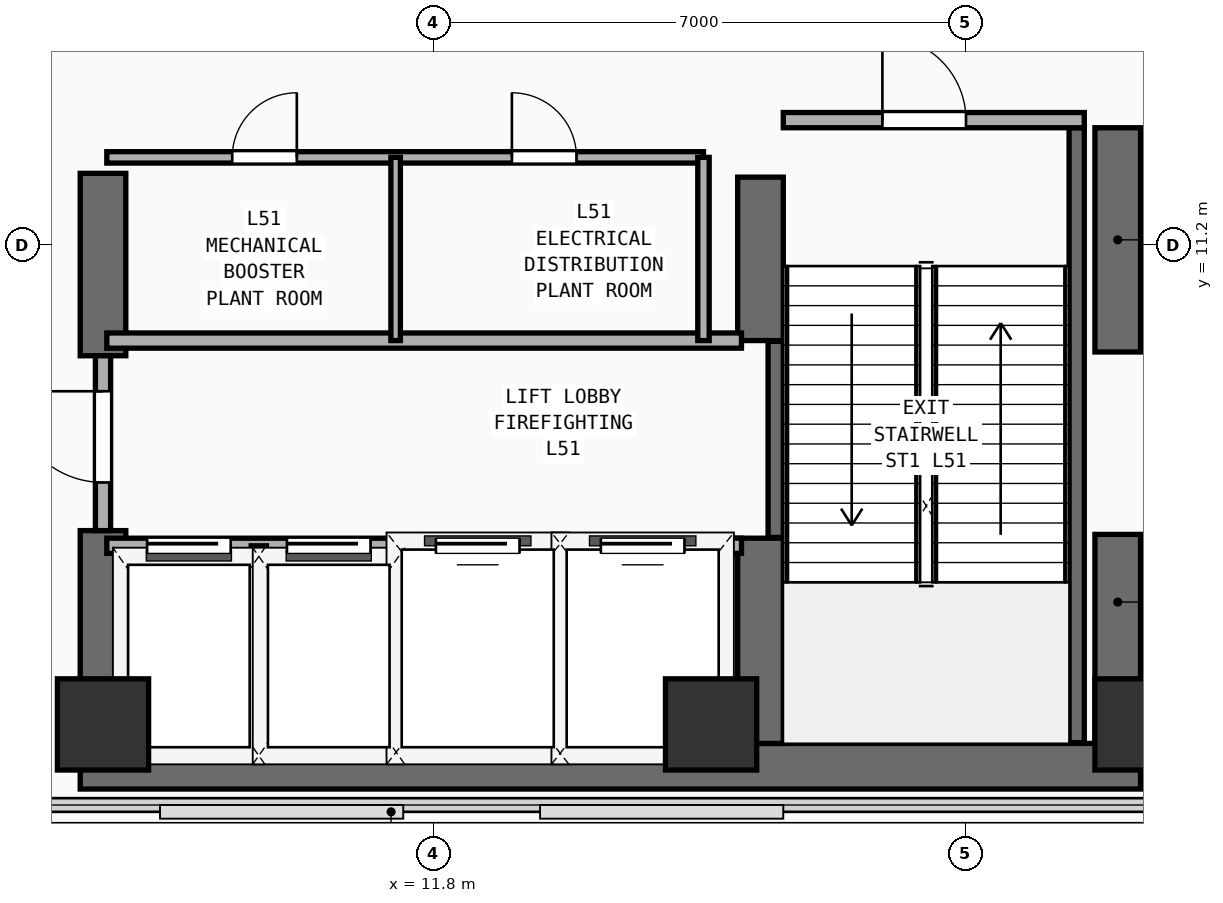
"""IFC4 building model, lengths in metres.
Left out: names, types, materials, properties, quantities, classifications, styles, units other than length and angle.
Written with IfcOpenShell. Run it as: python <this file> out.ifc"""

import sys

from ifc_helpers import new_model, si_unit, direction, frame, frame_2d, origin, origin_2d, place, context, subcontext, project, spatial, rectangle, extrude, element, fill, save


model = new_model("IFC4")
c1 = context("Model", 3, precision=1e-05, world=origin(), true_north=direction((0.0, 1.0)))
c2 = subcontext(c1, "Body", "Model", "MODEL_VIEW")
j1 = project(units=[si_unit("LENGTHUNIT", "METRE"), si_unit("PLANEANGLEUNIT", "RADIAN")], contexts=[c1])
p1 = place(None, origin())
s1 = spatial("IfcSite", under=j1, at=p1, CompositionType="ELEMENT")
p2 = place(p1, origin())
s2 = spatial("IfcBuilding", under=s1, at=p2, CompositionType="ELEMENT")
p3 = place(p2, frame((0.0, 0.0, 199.4)))
s3 = spatial("IfcBuildingStorey", under=s2, at=p3, CompositionType="ELEMENT", Elevation=199.4)
p4 = place(p3, frame((7.15, 4.35, 0.0), z_axis=(0.0, 0.0, 1.0), x_axis=(1.0, 0.0, 0.0)))
e1 = element("IfcWall", 1, at=p4, inside=s3, PredefinedType="SHEAR", context=c2, shape_type="SweptSolid", body=[
    extrude(rectangle(XDim=13.95, YDim=0.6, at=frame_2d((6.975, 0.0))), origin(), (0.0, 0.0, 1.0), 4.86),
])
p5 = place(p3, frame((7.45, 4.65, 0.0), z_axis=(0.0, 0.0, 1.0), x_axis=(0.0, 1.0, 0.0)))
e2 = element("IfcWall", 2, at=p5, inside=s3, PredefinedType="SHEAR", context=c2, shape_type="SweptSolid", body=[
    extrude(rectangle(XDim=2.8, YDim=0.6, at=frame_2d((1.4, 0.0))), origin(), (0.0, 0.0, 1.0), 4.86),
])
p6 = place(p3, frame((7.45, 9.75, 0.0), z_axis=(0.0, 0.0, 1.0), x_axis=(0.0, 1.0, 0.0)))
e3 = element("IfcWall", 3, at=p6, inside=s3, PredefinedType="SHEAR", context=c2, shape_type="SweptSolid", body=[
    extrude(rectangle(XDim=2.4, YDim=0.6, at=frame_2d((1.2, 0.0))), origin(), (0.0, 0.0, 1.0), 4.86),
])
p7 = place(p3, frame((20.8, 4.65, 0.0), z_axis=(0.0, 0.0, 1.0), x_axis=(0.0, 1.0, 0.0)))
e4 = element("IfcWall", 4, at=p7, inside=s3, PredefinedType="SHEAR", context=c2, shape_type="SweptSolid", body=[
    extrude(rectangle(XDim=2.75, YDim=0.6, at=frame_2d((1.375, 0.0))), origin(), (0.0, 0.0, 1.0), 4.86),
])
p8 = place(p3, frame((20.8, 9.8, 0.0), z_axis=(0.0, 0.0, 1.0), x_axis=(0.0, 1.0, 0.0)))
e5 = element("IfcWall", 5, at=p8, inside=s3, PredefinedType="SHEAR", context=c2, shape_type="SweptSolid", body=[
    extrude(rectangle(XDim=2.95, YDim=0.6, at=frame_2d((1.475, 0.0))), origin(), (0.0, 0.0, 1.0), 4.86),
])
p9 = place(p3, frame((16.1, 4.65, 0.0), z_axis=(0.0, 0.0, 1.0), x_axis=(0.0, 1.0, 0.0)))
e6 = element("IfcWall", 6, at=p9, inside=s3, PredefinedType="SHEAR", context=c2, shape_type="SweptSolid", body=[
    extrude(rectangle(XDim=2.7, YDim=0.6, at=frame_2d((1.35, 0.0))), origin(), (0.0, 0.0, 1.0), 4.86),
])
p10 = place(p3, frame((16.1, 9.95, 0.0), z_axis=(0.0, 0.0, 1.0), x_axis=(0.0, 1.0, 0.0)))
e7 = element("IfcWall", 7, at=p10, inside=s3, PredefinedType="SHEAR", context=c2, shape_type="SweptSolid", body=[
    extrude(rectangle(XDim=2.15, YDim=0.6, at=frame_2d((1.075, 0.0))), origin(), (0.0, 0.0, 1.0), 4.86),
])
for number, where, z_axis, x_axis in (
    (8, (7.45, 4.9, 0.0), (0.0, 0.0, 1.0), (1.0, 0.0, 0.0)),
    (9, (15.45, 4.9, 0.0), (0.0, 0.0, 1.0), (1.0, 0.0, 0.0)),
    (10, (21.1, 4.9, 0.0), (0.0, 0.0, 1.0), (1.0, 0.0, 0.0)),
):
    element("IfcColumn", number, at=place(p3, frame(where, z_axis=z_axis, x_axis=x_axis)), inside=s3, PredefinedType="COLUMN", context=c2, shape_type="SweptSolid", body=[
        extrude(rectangle(XDim=1.2, YDim=1.2, at=origin_2d()), origin(), (0.0, 0.0, 1.0), 4.86),
    ])
p11 = place(p3, frame((16.3, 7.36, 0.0), z_axis=(0.0, 0.0, 1.0), x_axis=(0.0, 1.0, 0.0)))
e11 = element("IfcWall", 11, at=p11, inside=s3, PredefinedType="SHEAR", context=c2, shape_type="SweptSolid", body=[
    extrude(rectangle(XDim=2.58, YDim=0.2, at=frame_2d((1.29, 0.0))), origin(), (0.0, 0.0, 1.0), 4.86),
])
p12 = place(p3, frame((20.26, 4.66, 0.0), z_axis=(0.0, 0.0, 1.0), x_axis=(0.0, 1.0, 0.0)))
e12 = element("IfcWall", 12, at=p12, inside=s3, PredefinedType="SHEAR", context=c2, shape_type="SweptSolid", body=[
    extrude(rectangle(XDim=8.09, YDim=0.2, at=frame_2d((4.045, 0.0))), origin(), (0.0, 0.0, 1.0), 4.86),
])
p13 = place(p3, frame((16.4, 12.85, 0.0), z_axis=(0.0, 0.0, 1.0), x_axis=(1.0, 0.0, 0.0)))
e13 = element("IfcWall", 13, at=p13, inside=s3, PredefinedType="PARTITIONING", context=c2, shape_type="SweptSolid", body=[
    extrude(rectangle(XDim=3.96, YDim=0.2, at=frame_2d((1.98, 0.0))), origin(), (0.0, 0.0, 1.0), 4.86),
])
p14 = place(p13, frame((1.304, 0.0, 0.0)))
e14 = element("IfcOpeningElement", 14, at=p14, cuts=e13, PredefinedType="OPENING", context=c2, shape_type="SweptSolid", body=[
    extrude(rectangle(XDim=1.1, YDim=2.2, at=frame_2d((0.55, 1.1))), frame((0.0, 0.11, 0.0), z_axis=(0.0, -1.0, 0.0), x_axis=(1.0, 0.0, 0.0)), (0.0, 0.0, 1.0), 0.22),
])
p15 = place(p3, frame((7.5, 7.25, 0.0), z_axis=(0.0, 0.0, 1.0), x_axis=(1.0, 0.0, 0.0)))
e15 = element("IfcWall", 15, at=p15, inside=s3, PredefinedType="PARTITIONING", context=c2, shape_type="SweptSolid", body=[
    extrude(rectangle(XDim=8.35, YDim=0.2, at=frame_2d((4.175, 0.0))), origin(), (0.0, 0.0, 1.0), 4.86),
])
p16 = place(p15, frame((0.53, 0.0, 0.0)))
e16 = element("IfcOpeningElement", 16, at=p16, cuts=e15, PredefinedType="OPENING", context=c2, shape_type="SweptSolid", body=[
    extrude(rectangle(XDim=1.1, YDim=2.2, at=frame_2d((0.55, 1.1))), frame((0.0, 0.11, 0.0), z_axis=(0.0, -1.0, 0.0), x_axis=(1.0, 0.0, 0.0)), (0.0, 0.0, 1.0), 0.22),
])
p17 = place(p15, frame((2.37, 0.0, 0.0)))
e17 = element("IfcOpeningElement", 17, at=p17, cuts=e15, PredefinedType="OPENING", context=c2, shape_type="SweptSolid", body=[
    extrude(rectangle(XDim=1.1, YDim=2.2, at=frame_2d((0.55, 1.1))), frame((0.0, 0.11, 0.0), z_axis=(0.0, -1.0, 0.0), x_axis=(1.0, 0.0, 0.0)), (0.0, 0.0, 1.0), 0.22),
])
p18 = place(p15, frame((4.33, 0.0, 0.0)))
e18 = element("IfcOpeningElement", 18, at=p18, cuts=e15, PredefinedType="OPENING", context=c2, shape_type="SweptSolid", body=[
    extrude(rectangle(XDim=1.1, YDim=2.2, at=frame_2d((0.55, 1.1))), frame((0.0, 0.11, 0.0), z_axis=(0.0, -1.0, 0.0), x_axis=(1.0, 0.0, 0.0)), (0.0, 0.0, 1.0), 0.22),
])
p19 = place(p15, frame((6.5, 0.0, 0.0)))
e19 = element("IfcOpeningElement", 19, at=p19, cuts=e15, PredefinedType="OPENING", context=c2, shape_type="SweptSolid", body=[
    extrude(rectangle(XDim=1.1, YDim=2.2, at=frame_2d((0.55, 1.1))), frame((0.0, 0.11, 0.0), z_axis=(0.0, -1.0, 0.0), x_axis=(1.0, 0.0, 0.0)), (0.0, 0.0, 1.0), 0.22),
])
p20 = place(p3, frame((7.5, 9.95, 0.0), z_axis=(0.0, 0.0, 1.0), x_axis=(1.0, 0.0, 0.0)))
e20 = element("IfcWall", 20, at=p20, inside=s3, PredefinedType="PARTITIONING", context=c2, shape_type="SweptSolid", body=[
    extrude(rectangle(XDim=8.35, YDim=0.2, at=frame_2d((4.175, 0.0))), origin(), (0.0, 0.0, 1.0), 4.86),
])
for number, where, z_axis, x_axis in (
    (21, (9.5, 4.45, 0.0), (0.0, 0.0, 1.0), (0.0, 1.0, 0.0)),
    (22, (11.36, 4.45, 0.0), (0.0, 0.0, 1.0), (0.0, 1.0, 0.0)),
    (23, (13.46, 4.45, 0.0), (0.0, 0.0, 1.0), (0.0, 1.0, 0.0)),
):
    element("IfcWall", number, at=place(p3, frame(where, z_axis=z_axis, x_axis=x_axis)), inside=s3, PredefinedType="PARTITIONING", context=c2, shape_type="SweptSolid", body=[
        extrude(rectangle(XDim=2.8, YDim=0.2, at=frame_2d((1.4, 0.0))), origin(), (0.0, 0.0, 1.0), 4.86),
    ])
p21 = place(p3, frame((7.45, 7.45, 0.0), z_axis=(0.0, 0.0, 1.0), x_axis=(0.0, 1.0, 0.0)))
e24 = element("IfcWall", 24, at=p21, inside=s3, PredefinedType="PARTITIONING", context=c2, shape_type="SweptSolid", body=[
    extrude(rectangle(XDim=2.3, YDim=0.2, at=frame_2d((1.15, 0.0))), origin(), (0.0, 0.0, 1.0), 3.84),
])
p22 = place(p21, frame((0.633, 0.0, 0.0)))
e25 = element("IfcOpeningElement", 25, at=p22, cuts=e24, PredefinedType="OPENING", context=c2, shape_type="SweptSolid", body=[
    extrude(rectangle(XDim=1.2, YDim=2.25, at=frame_2d((0.6, 1.125))), frame((0.0, 0.11, 0.0), z_axis=(0.0, -1.0, 0.0), x_axis=(1.0, 0.0, 0.0)), (0.0, 0.0, 1.0), 0.22),
])
p23 = place(p3, frame((7.5, 12.36, 0.0), z_axis=(0.0, 0.0, 1.0), x_axis=(1.0, 0.0, 0.0)))
e26 = element("IfcWall", 26, at=p23, inside=s3, PredefinedType="PARTITIONING", context=c2, shape_type="SweptSolid", body=[
    extrude(rectangle(XDim=7.85, YDim=0.15, at=frame_2d((3.925, 0.0))), origin(), (0.0, 0.0, 1.0), 4.86),
])
p24 = place(p23, frame((1.65, 0.0, 0.0)))
e27 = element("IfcOpeningElement", 27, at=p24, cuts=e26, PredefinedType="OPENING", context=c2, shape_type="SweptSolid", body=[
    extrude(rectangle(XDim=0.85, YDim=2.15, at=frame_2d((0.425, 1.075))), frame((0.0, 0.085, 0.0), z_axis=(0.0, -1.0, 0.0), x_axis=(1.0, 0.0, 0.0)), (0.0, 0.0, 1.0), 0.17),
])
p25 = place(p23, frame((5.329, 0.0, 0.0)))
e28 = element("IfcOpeningElement", 28, at=p25, cuts=e26, PredefinedType="OPENING", context=c2, shape_type="SweptSolid", body=[
    extrude(rectangle(XDim=0.85, YDim=2.15, at=frame_2d((0.425, 1.075))), frame((0.0, 0.085, 0.0), z_axis=(0.0, -1.0, 0.0), x_axis=(1.0, 0.0, 0.0)), (0.0, 0.0, 1.0), 0.17),
])
p26 = place(p3, frame((15.35, 9.95, 0.0), z_axis=(0.0, 0.0, 1.0), x_axis=(0.0, 1.0, 0.0)))
e29 = element("IfcWall", 29, at=p26, inside=s3, PredefinedType="PARTITIONING", context=c2, shape_type="SweptSolid", body=[
    extrude(rectangle(XDim=2.41, YDim=0.15, at=frame_2d((1.205, 0.0))), origin(), (0.0, 0.0, 1.0), 4.86),
])
p27 = place(p3, frame((11.3, 9.95, 0.0), z_axis=(0.0, 0.0, 1.0), x_axis=(0.0, 1.0, 0.0)))
e30 = element("IfcWall", 30, at=p27, inside=s3, PredefinedType="PARTITIONING", context=c2, shape_type="SweptSolid", body=[
    extrude(rectangle(XDim=2.41, YDim=0.125, at=frame_2d((1.205, 0.0))), origin(), (0.0, 0.0, 1.0), 4.86),
])
p28 = place(p14, frame((1.1, 0.0, 0.0), z_axis=(0.0, 0.0, 1.0), x_axis=(-1.0, 0.0, 0.0)))
e31 = element("IfcDoor", 31, at=p28, inside=s3, OperationType="SINGLE_SWING_RIGHT", PredefinedType="DOOR", context=c2, shape_type="SweptSolid", body=[
    extrude(rectangle(XDim=1.1, YDim=2.2, at=frame_2d((0.55, 1.1))), frame((0.0, 0.025, 0.0), z_axis=(0.0, -1.0, 0.0), x_axis=(1.0, 0.0, 0.0)), (0.0, 0.0, 1.0), 0.05),
])
fill(e14, e31)
p29 = place(p16, origin())
e32 = element("IfcDoor", 32, at=p29, inside=s3, OperationType="SLIDING_TO_LEFT", PredefinedType="DOOR", context=c2, shape_type="SweptSolid", body=[
    extrude(rectangle(XDim=1.1, YDim=2.2, at=frame_2d((0.55, 1.1))), frame((0.0, 0.025, 0.0), z_axis=(0.0, -1.0, 0.0), x_axis=(1.0, 0.0, 0.0)), (0.0, 0.0, 1.0), 0.05),
])
fill(e16, e32)
p30 = place(p17, origin())
e33 = element("IfcDoor", 33, at=p30, inside=s3, OperationType="SLIDING_TO_LEFT", PredefinedType="DOOR", context=c2, shape_type="SweptSolid", body=[
    extrude(rectangle(XDim=1.1, YDim=2.2, at=frame_2d((0.55, 1.1))), frame((0.0, 0.025, 0.0), z_axis=(0.0, -1.0, 0.0), x_axis=(1.0, 0.0, 0.0)), (0.0, 0.0, 1.0), 0.05),
])
fill(e17, e33)
p31 = place(p18, origin())
e34 = element("IfcDoor", 34, at=p31, inside=s3, OperationType="SLIDING_TO_LEFT", PredefinedType="DOOR", context=c2, shape_type="SweptSolid", body=[
    extrude(rectangle(XDim=1.1, YDim=2.2, at=frame_2d((0.55, 1.1))), frame((0.0, 0.025, 0.0), z_axis=(0.0, -1.0, 0.0), x_axis=(1.0, 0.0, 0.0)), (0.0, 0.0, 1.0), 0.05),
])
fill(e18, e34)
p32 = place(p19, origin())
e35 = element("IfcDoor", 35, at=p32, inside=s3, OperationType="SLIDING_TO_LEFT", PredefinedType="DOOR", context=c2, shape_type="SweptSolid", body=[
    extrude(rectangle(XDim=1.1, YDim=2.2, at=frame_2d((0.55, 1.1))), frame((0.0, 0.025, 0.0), z_axis=(0.0, -1.0, 0.0), x_axis=(1.0, 0.0, 0.0)), (0.0, 0.0, 1.0), 0.05),
])
fill(e19, e35)
p33 = place(p22, frame((1.2, 0.0, 0.0), z_axis=(0.0, 0.0, 1.0), x_axis=(-1.0, 0.0, 0.0)))
e36 = element("IfcDoor", 36, at=p33, inside=s3, OperationType="SINGLE_SWING_LEFT", PredefinedType="DOOR", context=c2, shape_type="SweptSolid", body=[
    extrude(rectangle(XDim=1.2, YDim=2.25, at=frame_2d((0.6, 1.125))), frame((0.0, 0.025, 0.0), z_axis=(0.0, -1.0, 0.0), x_axis=(1.0, 0.0, 0.0)), (0.0, 0.0, 1.0), 0.05),
])
fill(e25, e36)
p34 = place(p24, origin())
e37 = element("IfcDoor", 37, at=p34, inside=s3, OperationType="SINGLE_SWING_RIGHT", PredefinedType="DOOR", context=c2, shape_type="SweptSolid", body=[
    extrude(rectangle(XDim=0.85, YDim=2.15, at=frame_2d((0.425, 1.075))), frame((0.0, 0.025, 0.0), z_axis=(0.0, -1.0, 0.0), x_axis=(1.0, 0.0, 0.0)), (0.0, 0.0, 1.0), 0.05),
])
fill(e27, e37)
p35 = place(p25, origin())
e38 = element("IfcDoor", 38, at=p35, inside=s3, OperationType="SINGLE_SWING_LEFT", PredefinedType="DOOR", context=c2, shape_type="SweptSolid", body=[
    extrude(rectangle(XDim=0.85, YDim=2.15, at=frame_2d((0.425, 1.075))), frame((0.0, 0.025, 0.0), z_axis=(0.0, -1.0, 0.0), x_axis=(1.0, 0.0, 0.0)), (0.0, 0.0, 1.0), 0.05),
])
fill(e28, e38)
save(model, sys.argv[1])
